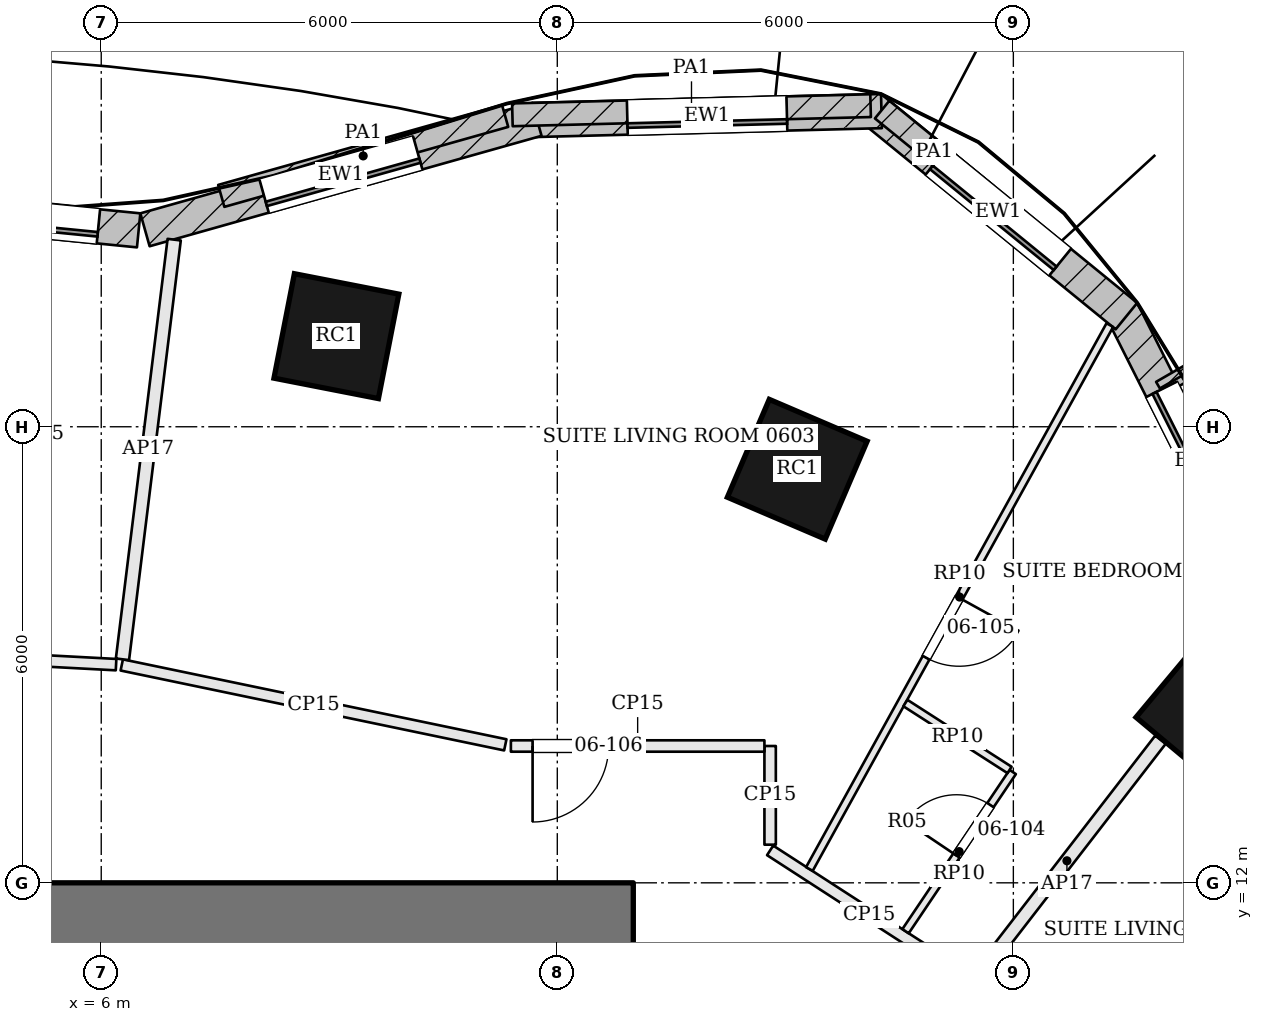
"""IFC4 building model, lengths in metres.
Left out: names, types, materials, properties, quantities, classifications, styles, units other than length and angle.
Written with IfcOpenShell. Run it as: python <this file> out.ifc"""

import sys

from ifc_helpers import new_model, si_unit, direction, frame, frame_2d, origin, origin_2d, place, context, subcontext, project, spatial, rectangle, extrude, element, fill, save


model = new_model("IFC4")
c1 = context("Model", 3, precision=1e-05, world=origin(), true_north=direction((0.0, 1.0)))
c2 = subcontext(c1, "Body", "Model", "MODEL_VIEW")
j1 = project(units=[si_unit("LENGTHUNIT", "METRE"), si_unit("PLANEANGLEUNIT", "RADIAN")], contexts=[c1])
p1 = place(None, origin())
s1 = spatial("IfcSite", under=j1, at=p1, CompositionType="ELEMENT")
p2 = place(p1, origin())
s2 = spatial("IfcBuilding", under=s1, at=p2, CompositionType="ELEMENT")
p3 = place(p2, frame((0.0, 0.0, 37.5)))
s3 = spatial("IfcBuildingStorey", under=s2, at=p3, CompositionType="ELEMENT", Elevation=37.5)
p4 = place(p3, frame((-13.0, 11.3, 0.0), z_axis=(0.0, 0.0, 1.0), x_axis=(1.0, 0.0, 0.0)))
e1 = element("IfcWall", 1, at=p4, inside=s3, PredefinedType="SHEAR", context=c2, shape_type="SweptSolid", body=[
    extrude(rectangle(XDim=26.0, YDim=1.4, at=frame_2d((13.0, 0.0))), origin(), (0.0, 0.0, 1.0), 3.6),
])
p5 = place(p4, frame((9.225, 0.0, 0.0)))
e2 = element("IfcOpeningElement", 2, at=p5, cuts=e1, PredefinedType="OPENING", context=c2, shape_type="SweptSolid", body=[
    extrude(rectangle(XDim=1.0, YDim=2.1, at=frame_2d((0.5, 1.05))), frame((0.0, 0.71, 0.0), z_axis=(0.0, -1.0, 0.0), x_axis=(1.0, 0.0, 0.0)), (0.0, 0.0, 1.0), 1.42),
])
p6 = place(p4, frame((11.825, 0.0, 0.0)))
e3 = element("IfcOpeningElement", 3, at=p6, cuts=e1, PredefinedType="OPENING", context=c2, shape_type="SweptSolid", body=[
    extrude(rectangle(XDim=0.7, YDim=2.1, at=frame_2d((0.35, 1.05))), frame((0.0, 0.71, 0.0), z_axis=(0.0, -1.0, 0.0), x_axis=(1.0, 0.0, 0.0)), (0.0, 0.0, 1.0), 1.42),
])
p7 = place(p4, frame((13.725, 0.0, 0.0)))
e4 = element("IfcOpeningElement", 4, at=p7, cuts=e1, PredefinedType="OPENING", context=c2, shape_type="SweptSolid", body=[
    extrude(rectangle(XDim=1.0, YDim=2.1, at=frame_2d((0.5, 1.05))), frame((0.0, 0.71, 0.0), z_axis=(0.0, -1.0, 0.0), x_axis=(1.0, 0.0, 0.0)), (0.0, 0.0, 1.0), 1.42),
])
p8 = place(p4, frame((16.225, 0.0, 0.0)))
e5 = element("IfcOpeningElement", 5, at=p8, cuts=e1, PredefinedType="OPENING", context=c2, shape_type="SweptSolid", body=[
    extrude(rectangle(XDim=0.9, YDim=2.1, at=frame_2d((0.45, 1.05))), frame((0.0, 0.71, 0.0), z_axis=(0.0, -1.0, 0.0), x_axis=(1.0, 0.0, 0.0)), (0.0, 0.0, 1.0), 1.42),
])
for number, where, z_axis, x_axis in (
    (6, (20.6, 14.266, 0.0), (0.0, 0.0, 1.0), (-0.767, 0.641, 0.0)),
    (7, (15.157, 17.441, 0.0), (0.0, 0.0, 1.0), (-0.919, 0.394, 0.0)),
    (8, (9.094, 19.192, 0.0), (0.0, 0.0, 1.0), (-0.981, 0.192, 0.0)),
):
    element("IfcColumn", number, at=place(p3, frame(where, z_axis=z_axis, x_axis=x_axis)), inside=s3, PredefinedType="COLUMN", context=c2, shape_type="SweptSolid", body=[
        extrude(rectangle(XDim=1.4, YDim=1.4, at=origin_2d()), origin(), (0.0, 0.0, 1.0), 3.6),
    ])
p9 = place(p3, frame((21.413, 15.586, 0.0), z_axis=(0.0, 0.0, 1.0), x_axis=(-0.449428064685, 0.893316525467, 0.0)))
e9 = element("IfcWall", 9, at=p9, inside=s3, PredefinedType="SOLIDWALL", context=c2, shape_type="SweptSolid", body=[
    extrude(rectangle(XDim=4.407, YDim=0.45, at=frame_2d((2.204, 0.0))), origin(), (0.0, 0.0, 1.0), 3.4),
])
p10 = place(p9, frame((1.154, 0.0, 0.9)))
e10 = element("IfcOpeningElement", 10, at=p10, cuts=e9, PredefinedType="OPENING", context=c2, shape_type="SweptSolid", body=[
    extrude(rectangle(XDim=2.1, YDim=2.0, at=frame_2d((1.05, 1.0))), frame((0.0, 0.235, 0.0), z_axis=(0.0, -1.0, 0.0), x_axis=(1.0, 0.0, 0.0)), (0.0, 0.0, 1.0), 0.47),
])
p11 = place(p3, frame((19.488, 19.456, 0.0), z_axis=(0.0, 0.0, 1.0), x_axis=(-0.775096506427, 0.631842864741, 0.0)))
e11 = element("IfcWall", 11, at=p11, inside=s3, PredefinedType="SOLIDWALL", context=c2, shape_type="SweptSolid", body=[
    extrude(rectangle(XDim=4.349, YDim=0.45, at=frame_2d((2.175, 0.0))), origin(), (0.0, 0.0, 1.0), 3.4),
])
p12 = place(p11, frame((1.125, 0.0, 0.9)))
e12 = element("IfcOpeningElement", 12, at=p12, cuts=e11, PredefinedType="OPENING", context=c2, shape_type="SweptSolid", body=[
    extrude(rectangle(XDim=2.1, YDim=2.0, at=frame_2d((1.05, 1.0))), frame((0.0, 0.235, 0.0), z_axis=(0.0, -1.0, 0.0), x_axis=(1.0, 0.0, 0.0)), (0.0, 0.0, 1.0), 0.47),
])
p13 = place(p3, frame((16.265, 22.153, 0.0), z_axis=(0.0, 0.0, 1.0), x_axis=(-0.999672618135, -0.025586257081, 0.0)))
e13 = element("IfcWall", 13, at=p13, inside=s3, PredefinedType="SOLIDWALL", context=c2, shape_type="SweptSolid", body=[
    extrude(rectangle(XDim=4.59, YDim=0.45, at=frame_2d((2.295, 0.0))), origin(), (0.0, 0.0, 1.0), 3.4),
])
p14 = place(p13, frame((1.245, 0.0, 0.9)))
e14 = element("IfcOpeningElement", 14, at=p14, cuts=e13, PredefinedType="OPENING", context=c2, shape_type="SweptSolid", body=[
    extrude(rectangle(XDim=2.1, YDim=2.0, at=frame_2d((1.05, 1.0))), frame((0.0, 0.235, 0.0), z_axis=(0.0, -1.0, 0.0), x_axis=(1.0, 0.0, 0.0)), (0.0, 0.0, 1.0), 0.47),
])
p15 = place(p3, frame((11.732, 22.044, 0.0), z_axis=(0.0, 0.0, 1.0), x_axis=(-0.962535416232, -0.271155992925, 0.0)))
e15 = element("IfcWall", 15, at=p15, inside=s3, PredefinedType="SOLIDWALL", context=c2, shape_type="SweptSolid", body=[
    extrude(rectangle(XDim=5.357, YDim=0.45, at=frame_2d((2.679, 0.0))), origin(), (0.0, 0.0, 1.0), 3.4),
])
p16 = place(p15, frame((1.629, 0.0, 0.9)))
e16 = element("IfcOpeningElement", 16, at=p16, cuts=e15, PredefinedType="OPENING", context=c2, shape_type="SweptSolid", body=[
    extrude(rectangle(XDim=2.1, YDim=2.0, at=frame_2d((1.05, 1.0))), frame((0.0, 0.235, 0.0), z_axis=(0.0, -1.0, 0.0), x_axis=(1.0, 0.0, 0.0)), (0.0, 0.0, 1.0), 0.47),
])
p17 = place(p3, frame((6.492, 20.584, 0.0), z_axis=(0.0, 0.0, 1.0), x_axis=(-0.995123748575, 0.098634299418, 0.0)))
e17 = element("IfcWall", 17, at=p17, inside=s3, PredefinedType="SOLIDWALL", context=c2, shape_type="SweptSolid", body=[
    extrude(rectangle(XDim=2.864, YDim=0.45, at=frame_2d((1.432, 0.0))), origin(), (0.0, 0.0, 1.0), 3.4),
])
p18 = place(p17, frame((0.532, 0.0, 0.9)))
e18 = element("IfcOpeningElement", 18, at=p18, cuts=e17, PredefinedType="OPENING", context=c2, shape_type="SweptSolid", body=[
    extrude(rectangle(XDim=1.8, YDim=2.0, at=frame_2d((0.9, 1.0))), frame((0.0, 0.235, 0.0), z_axis=(0.0, -1.0, 0.0), x_axis=(1.0, 0.0, 0.0)), (0.0, 0.0, 1.0), 0.47),
])
p19 = place(p3, frame((19.928, 18.504, 0.0), z_axis=(0.0, 0.0, 1.0), x_axis=(0.865881186914, 0.500249707794, 0.0)))
e19 = element("IfcWall", 19, at=p19, inside=s3, PredefinedType="SOLIDWALL", context=c2, shape_type="SweptSolid", body=[
    extrude(rectangle(XDim=1.75, YDim=0.2, at=frame_2d((0.875, 0.0))), origin(), (0.0, 0.0, 1.0), 3.4),
])
p20 = place(p3, frame((17.647, 21.053, 3.6), z_axis=(0.0, 0.0, 1.0), x_axis=(-0.775067490636, 0.631878457426, 0.0)))
e20 = element("IfcWall", 20, at=p20, inside=s3, PredefinedType="PARAPET", context=c2, shape_type="SweptSolid", body=[
    extrude(rectangle(XDim=1.771, YDim=0.3, at=frame_2d((0.886, 0.0))), origin(), (0.0, 0.0, 1.0), 1.1),
])
p21 = place(p3, frame((16.122, 22.224, 3.6), z_axis=(0.0, 0.0, 1.0), x_axis=(-0.999672688687, -0.025583500399, 0.0)))
e21 = element("IfcWall", 21, at=p21, inside=s3, PredefinedType="PARAPET", context=c2, shape_type="SweptSolid", body=[
    extrude(rectangle(XDim=4.714, YDim=0.3, at=frame_2d((2.357, 0.0))), origin(), (0.0, 0.0, 1.0), 1.1),
])
p22 = place(p3, frame((11.314, 22.089, 3.6), z_axis=(0.0, 0.0, 1.0), x_axis=(-0.962524249835, -0.271195627691, 0.0)))
e22 = element("IfcWall", 22, at=p22, inside=s3, PredefinedType="PARAPET", context=c2, shape_type="SweptSolid", body=[
    extrude(rectangle(XDim=3.88, YDim=0.3, at=frame_2d((1.94, 0.0))), origin(), (0.0, 0.0, 1.0), 1.1),
])
p23 = place(p3, frame((19.936, 13.883, 0.0), z_axis=(0.0, 0.0, 1.0), x_axis=(-0.611406081733, -0.791317005516, 0.0)))
e23 = element("IfcWall", 23, at=p23, inside=s3, PredefinedType="PARTITIONING", context=c2, shape_type="SweptSolid", body=[
    extrude(rectangle(XDim=4.026, YDim=0.175, at=frame_2d((2.013, 0.0))), origin(), (0.0, 0.0, 1.0), 2.68),
])
p24 = place(p3, frame((17.411, 10.738, 0.0), z_axis=(0.0, 0.0, 1.0), x_axis=(-0.839570157152, 0.543251278157, 0.0)))
e24 = element("IfcWall", 24, at=p24, inside=s3, PredefinedType="PARTITIONING", context=c2, shape_type="SweptSolid", body=[
    extrude(rectangle(XDim=3.109, YDim=0.15, at=frame_2d((1.555, 0.0))), origin(), (0.0, 0.0, 1.0), 2.68),
])
p25 = place(p3, frame((14.8, 12.502, 0.0), z_axis=(0.0, 0.0, 1.0), x_axis=(-0.000188040613, 0.99999998232, 0.0)))
e25 = element("IfcWall", 25, at=p25, inside=s3, PredefinedType="PARTITIONING", context=c2, shape_type="SweptSolid", body=[
    extrude(rectangle(XDim=1.298, YDim=0.15, at=frame_2d((0.649, 0.0))), origin(), (0.0, 0.0, 1.0), 2.68),
])
p26 = place(p3, frame((14.725, 13.8, 0.0), z_axis=(0.0, 0.0, 1.0), x_axis=(-1.0, 0.0, 0.0)))
e26 = element("IfcWall", 26, at=p26, inside=s3, PredefinedType="PARTITIONING", context=c2, shape_type="SweptSolid", body=[
    extrude(rectangle(XDim=3.336, YDim=0.15, at=frame_2d((1.668, 0.0))), origin(), (0.0, 0.0, 1.0), 2.68),
])
p27 = place(p26, frame((2.05, 0.0, 0.0)))
e27 = element("IfcOpeningElement", 27, at=p27, cuts=e26, PredefinedType="OPENING", context=c2, shape_type="SweptSolid", body=[
    extrude(rectangle(XDim=1.0, YDim=2.1, at=frame_2d((0.5, 1.05))), frame((0.0, 0.085, 0.0), z_axis=(0.0, -1.0, 0.0), x_axis=(1.0, 0.0, 0.0)), (0.0, 0.0, 1.0), 0.17),
])
p28 = place(p3, frame((11.316, 13.815, 0.0), z_axis=(0.0, 0.0, 1.0), x_axis=(-0.978978843439, 0.203961820198, 0.0)))
e28 = element("IfcWall", 28, at=p28, inside=s3, PredefinedType="PARTITIONING", context=c2, shape_type="SweptSolid", body=[
    extrude(rectangle(XDim=5.154, YDim=0.15, at=frame_2d((2.577, 0.0))), origin(), (0.0, 0.0, 1.0), 2.68),
])
p29 = place(p3, frame((6.96, 20.462, 0.0), z_axis=(0.0, 0.0, 1.0), x_axis=(-0.122322154521, -0.992490448575, 0.0)))
e29 = element("IfcWall", 29, at=p29, inside=s3, PredefinedType="PARTITIONING", context=c2, shape_type="SweptSolid", body=[
    extrude(rectangle(XDim=5.562, YDim=0.175, at=frame_2d((2.781, 0.0))), origin(), (0.0, 0.0, 1.0), 2.68),
])
p30 = place(p3, frame((6.195, 14.87, 0.0), z_axis=(0.0, 0.0, 1.0), x_axis=(-0.99858788346, 0.053124749475, 0.0)))
e30 = element("IfcWall", 30, at=p30, inside=s3, PredefinedType="PARTITIONING", context=c2, shape_type="SweptSolid", body=[
    extrude(rectangle(XDim=6.204, YDim=0.15, at=frame_2d((3.102, 0.0))), origin(), (0.0, 0.0, 1.0), 2.68),
])
p31 = place(p3, frame((24.157, 12.06, 0.0), z_axis=(0.0, 0.0, 1.0), x_axis=(-0.784024125513, -0.620730352579, 0.0)))
e31 = element("IfcWall", 31, at=p31, inside=s3, PredefinedType="PARTITIONING", context=c2, shape_type="SweptSolid", body=[
    extrude(rectangle(XDim=5.704, YDim=0.1, at=frame_2d((2.852, 0.0))), origin(), (0.0, 0.0, 1.0), 2.884),
])
p32 = place(p31, frame((1.554, 0.0, 0.0)))
e32 = element("IfcOpeningElement", 32, at=p32, cuts=e31, PredefinedType="OPENING", context=c2, shape_type="SweptSolid", body=[
    extrude(rectangle(XDim=0.9, YDim=2.4, at=frame_2d((0.45, 1.2))), frame((0.0, 0.06, 0.0), z_axis=(0.0, -1.0, 0.0), x_axis=(1.0, 0.0, 0.0)), (0.0, 0.0, 1.0), 0.12),
])
p33 = place(p3, frame((19.269, 19.337, 0.0), z_axis=(0.0, 0.0, 1.0), x_axis=(-0.483536788566, -0.875324039487, 0.0)))
e33 = element("IfcWall", 33, at=p33, inside=s3, PredefinedType="PARTITIONING", context=c2, shape_type="SweptSolid", body=[
    extrude(rectangle(XDim=8.174, YDim=0.1, at=frame_2d((4.087, 0.0))), origin(), (0.0, 0.0, 1.0), 2.884),
])
p34 = place(p33, frame((4.099, 0.0, 0.0)))
e34 = element("IfcOpeningElement", 34, at=p34, cuts=e33, PredefinedType="OPENING", context=c2, shape_type="SweptSolid", body=[
    extrude(rectangle(XDim=0.9, YDim=2.4, at=frame_2d((0.45, 1.2))), frame((0.0, 0.06, 0.0), z_axis=(0.0, -1.0, 0.0), x_axis=(1.0, 0.0, 0.0)), (0.0, 0.0, 1.0), 0.12),
])
p35 = place(p3, frame((16.582, 11.364, 0.0), z_axis=(0.0, 0.0, 1.0), x_axis=(0.558554224274, 0.829468009356, 0.0)))
e35 = element("IfcWall", 35, at=p35, inside=s3, PredefinedType="PARTITIONING", context=c2, shape_type="SweptSolid", body=[
    extrude(rectangle(XDim=2.525, YDim=0.1, at=frame_2d((1.263, 0.0))), origin(), (0.0, 0.0, 1.0), 2.884),
])
p36 = place(p35, frame((1.2, 0.0, 0.0)))
e36 = element("IfcOpeningElement", 36, at=p36, cuts=e35, PredefinedType="OPENING", context=c2, shape_type="SweptSolid", body=[
    extrude(rectangle(XDim=0.8, YDim=2.1, at=frame_2d((0.4, 1.05))), frame((0.0, 0.06, 0.0), z_axis=(0.0, -1.0, 0.0), x_axis=(1.0, 0.0, 0.0)), (0.0, 0.0, 1.0), 0.12),
])
p37 = place(p3, frame((17.95, 13.485, 0.0), z_axis=(0.0, 0.0, 1.0), x_axis=(-0.841431701804, 0.540363480631, 0.0)))
e37 = element("IfcWall", 37, at=p37, inside=s3, PredefinedType="PARTITIONING", context=c2, shape_type="SweptSolid", body=[
    extrude(rectangle(XDim=1.628, YDim=0.1, at=frame_2d((0.814, 0.0))), origin(), (0.0, 0.0, 1.0), 2.884),
])
p38 = place(p10, origin())
e38 = element("IfcWindow", 38, at=p38, inside=s3, PartitioningType="SINGLE_PANEL", PredefinedType="WINDOW", context=c2, shape_type="SweptSolid", body=[
    extrude(rectangle(XDim=2.1, YDim=2.0, at=frame_2d((1.05, 1.0))), frame((0.0, 0.135, 0.0), z_axis=(0.0, -1.0, 0.0), x_axis=(1.0, 0.0, 0.0)), (0.0, 0.0, 1.0), 0.06),
])
fill(e10, e38)
p39 = place(p12, origin())
e39 = element("IfcWindow", 39, at=p39, inside=s3, PartitioningType="SINGLE_PANEL", PredefinedType="WINDOW", context=c2, shape_type="SweptSolid", body=[
    extrude(rectangle(XDim=2.1, YDim=2.0, at=frame_2d((1.05, 1.0))), frame((0.0, 0.135, 0.0), z_axis=(0.0, -1.0, 0.0), x_axis=(1.0, 0.0, 0.0)), (0.0, 0.0, 1.0), 0.06),
])
fill(e12, e39)
p40 = place(p14, origin())
e40 = element("IfcWindow", 40, at=p40, inside=s3, PartitioningType="SINGLE_PANEL", PredefinedType="WINDOW", context=c2, shape_type="SweptSolid", body=[
    extrude(rectangle(XDim=2.1, YDim=2.0, at=frame_2d((1.05, 1.0))), frame((0.0, 0.135, 0.0), z_axis=(0.0, -1.0, 0.0), x_axis=(1.0, 0.0, 0.0)), (0.0, 0.0, 1.0), 0.06),
])
fill(e14, e40)
p41 = place(p16, origin())
e41 = element("IfcWindow", 41, at=p41, inside=s3, PartitioningType="SINGLE_PANEL", PredefinedType="WINDOW", context=c2, shape_type="SweptSolid", body=[
    extrude(rectangle(XDim=2.1, YDim=2.0, at=frame_2d((1.05, 1.0))), frame((0.0, 0.135, 0.0), z_axis=(0.0, -1.0, 0.0), x_axis=(1.0, 0.0, 0.0)), (0.0, 0.0, 1.0), 0.06),
])
fill(e16, e41)
p42 = place(p18, origin())
e42 = element("IfcWindow", 42, at=p42, inside=s3, PartitioningType="SINGLE_PANEL", PredefinedType="WINDOW", context=c2, shape_type="SweptSolid", body=[
    extrude(rectangle(XDim=1.8, YDim=2.0, at=frame_2d((0.9, 1.0))), frame((0.0, 0.135, 0.0), z_axis=(0.0, -1.0, 0.0), x_axis=(1.0, 0.0, 0.0)), (0.0, 0.0, 1.0), 0.06),
])
fill(e18, e42)
p43 = place(p36, origin())
e43 = element("IfcDoor", 43, at=p43, inside=s3, OperationType="SINGLE_SWING_LEFT", PredefinedType="DOOR", context=c2, shape_type="SweptSolid", body=[
    extrude(rectangle(XDim=0.8, YDim=2.1, at=frame_2d((0.4, 1.05))), frame((0.0, 0.025, 0.0), z_axis=(0.0, -1.0, 0.0), x_axis=(1.0, 0.0, 0.0)), (0.0, 0.0, 1.0), 0.05),
])
fill(e36, e43)
p44 = place(p34, origin())
e44 = element("IfcDoor", 44, at=p44, inside=s3, OperationType="SINGLE_SWING_LEFT", PredefinedType="DOOR", context=c2, shape_type="SweptSolid", body=[
    extrude(rectangle(XDim=0.9, YDim=2.4, at=frame_2d((0.45, 1.2))), frame((0.0, 0.025, 0.0), z_axis=(0.0, -1.0, 0.0), x_axis=(1.0, 0.0, 0.0)), (0.0, 0.0, 1.0), 0.05),
])
fill(e34, e44)
p45 = place(p27, origin())
e45 = element("IfcDoor", 45, at=p45, inside=s3, OperationType="SINGLE_SWING_RIGHT", PredefinedType="DOOR", context=c2, shape_type="SweptSolid", body=[
    extrude(rectangle(XDim=1.0, YDim=2.1, at=frame_2d((0.5, 1.05))), frame((0.0, 0.025, 0.0), z_axis=(0.0, -1.0, 0.0), x_axis=(1.0, 0.0, 0.0)), (0.0, 0.0, 1.0), 0.05),
])
fill(e27, e45)
save(model, sys.argv[1])
